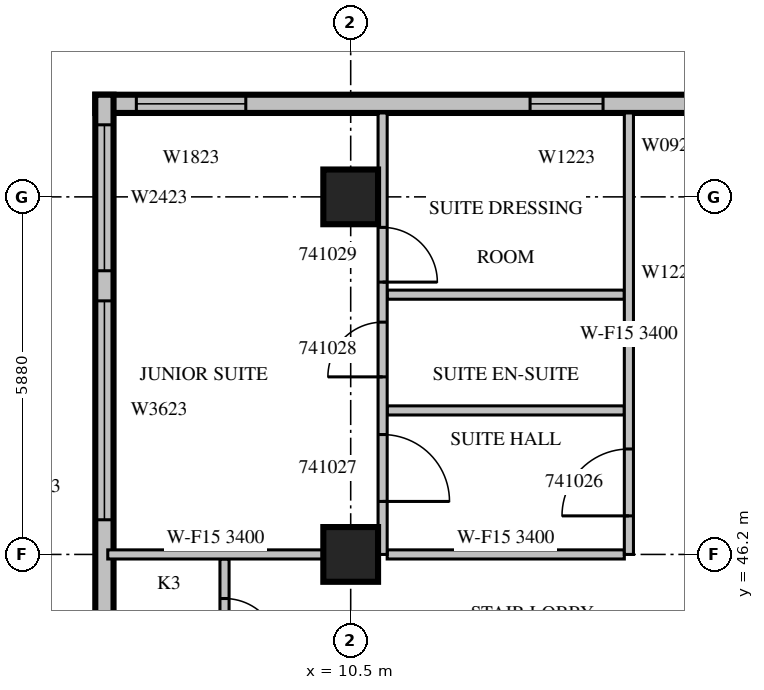
"""IFC4 building model, lengths in metres.
Left out: names, types, materials, properties, quantities, classifications, styles, units other than length and angle.
Written with IfcOpenShell. Run it as: python <this file> out.ifc"""

import sys

from ifc_helpers import new_model, si_unit, direction, frame, frame_2d, origin, origin_2d, place, context, subcontext, project, spatial, rectangle, extrude, source, transform, mapped, element, fill, save


model = new_model("IFC4")
c1 = context("Model", 3, precision=1e-05, world=origin(), true_north=direction((0.0, 1.0)))
c2 = subcontext(c1, "Body", "Model", "MODEL_VIEW")
j1 = project(units=[si_unit("LENGTHUNIT", "METRE"), si_unit("PLANEANGLEUNIT", "RADIAN")], contexts=[c1])
p1 = place(None, origin())
s1 = spatial("IfcSite", under=j1, at=p1, CompositionType="ELEMENT")
p2 = place(p1, origin())
s2 = spatial("IfcBuilding", under=s1, at=p2, CompositionType="ELEMENT")
p3 = place(p2, frame((0.0, 0.0, 189.2)))
s3 = spatial("IfcBuildingStorey", under=s2, at=p3, CompositionType="ELEMENT", Elevation=189.2)
m1 = source(origin(), c2, "Body", "SweptSolid", [
    extrude(rectangle(XDim=0.9, YDim=0.9, at=origin_2d()), origin(), (0.0, 0.0, 1.0), 3.8),
])
for number, where, z_axis, x_axis in (
    (1, (10.5, 46.2, 0.0), (0.0, 0.0, 1.0), (1.0, 0.0, 0.0)),
    (2, (10.5, 52.08, 0.0), (0.0, 0.0, 1.0), (1.0, 0.0, 0.0)),
):
    element("IfcColumn", number, at=place(p3, frame(where, z_axis=z_axis, x_axis=x_axis)), inside=s3, PredefinedType="COLUMN", context=c2, shape_type="MappedRepresentation", body=[
        mapped(m1, transform((0.0, 0.0, 0.0), scale=1.0)),
    ])
m2 = source(origin(), c2, "Body", "SweptSolid", [
    extrude(rectangle(XDim=10.5, YDim=0.3, at=frame_2d((5.25, 0.0))), origin(), (0.0, 0.0, 1.0), 3.4),
])
p4 = place(p3, frame((16.8, 53.61, 0.0), z_axis=(0.0, 0.0, 1.0), x_axis=(-1.0, 0.0, 0.0)))
e3 = element("IfcWall", 3, at=p4, inside=s3, PredefinedType="STANDARD", context=c2, shape_type="MappedRepresentation", body=[
    mapped(m2, transform((0.0, 0.0, 0.0), scale=1.0)),
])
m3 = source(origin(), c2, "Body", "SweptSolid", [
    extrude(rectangle(XDim=1.2, YDim=2.3, at=frame_2d((0.6, 1.15))), frame((0.0, 0.16, 0.0), z_axis=(0.0, -1.0, 0.0), x_axis=(1.0, 0.0, 0.0)), (0.0, 0.0, 1.0), 0.32),
])
p5 = place(p4, frame((2.15, 0.0, 0.6)))
e4 = element("IfcOpeningElement", 4, at=p5, cuts=e3, PredefinedType="OPENING", context=c2, shape_type="MappedRepresentation", body=[
    mapped(m3, transform((0.0, 0.0, 0.0), scale=1.0)),
])
m4 = source(origin(), c2, "Body", "SweptSolid", [
    extrude(rectangle(XDim=1.8, YDim=2.3, at=frame_2d((0.9, 1.15))), frame((0.0, 0.16, 0.0), z_axis=(0.0, -1.0, 0.0), x_axis=(1.0, 0.0, 0.0)), (0.0, 0.0, 1.0), 0.32),
])
p6 = place(p4, frame((8.025, 0.0, 0.6)))
e5 = element("IfcOpeningElement", 5, at=p6, cuts=e3, PredefinedType="OPENING", context=c2, shape_type="MappedRepresentation", body=[
    mapped(m4, transform((0.0, 0.0, 0.0), scale=1.0)),
])
m5 = source(origin(), c2, "Body", "SweptSolid", [
    extrude(rectangle(XDim=9.91, YDim=0.3, at=frame_2d((4.955, 0.0))), origin(), (0.0, 0.0, 1.0), 3.4),
])
p7 = place(p3, frame((6.45, 53.76, 0.0), z_axis=(0.0, 0.0, 1.0), x_axis=(0.0, -1.0, 0.0)))
e6 = element("IfcWall", 6, at=p7, inside=s3, PredefinedType="STANDARD", context=c2, shape_type="MappedRepresentation", body=[
    mapped(m5, transform((0.0, 0.0, 0.0), scale=1.0)),
])
m6 = source(origin(), c2, "Body", "SweptSolid", [
    extrude(rectangle(XDim=3.6, YDim=2.3, at=frame_2d((1.8, 1.15))), frame((0.0, 0.16, 0.0), z_axis=(0.0, -1.0, 0.0), x_axis=(1.0, 0.0, 0.0)), (0.0, 0.0, 1.0), 0.32),
])
p8 = place(p7, frame((3.39, 0.0, 0.6)))
e7 = element("IfcOpeningElement", 7, at=p8, cuts=e6, PredefinedType="OPENING", context=c2, shape_type="MappedRepresentation", body=[
    mapped(m6, transform((0.0, 0.0, 0.0), scale=1.0)),
])
m7 = source(origin(), c2, "Body", "SweptSolid", [
    extrude(rectangle(XDim=2.4, YDim=2.3, at=frame_2d((1.2, 1.15))), frame((0.0, 0.16, 0.0), z_axis=(0.0, -1.0, 0.0), x_axis=(1.0, 0.0, 0.0)), (0.0, 0.0, 1.0), 0.32),
])
p9 = place(p7, frame((0.495, 0.0, 0.6)))
e8 = element("IfcOpeningElement", 8, at=p9, cuts=e6, PredefinedType="OPENING", context=c2, shape_type="MappedRepresentation", body=[
    mapped(m7, transform((0.0, 0.0, 0.0), scale=1.0)),
])
m8 = source(origin(), c2, "Body", "SweptSolid", [
    extrude(rectangle(XDim=2.2, YDim=0.15, at=frame_2d((1.1, 0.0))), origin(), (0.0, 0.0, 1.0), 3.4),
])
p10 = place(p3, frame((8.425, 43.925, 0.0), z_axis=(0.0, 0.0, 1.0), x_axis=(0.0, 1.0, 0.0)))
e9 = element("IfcWall", 9, at=p10, inside=s3, PredefinedType="PARTITIONING", context=c2, shape_type="MappedRepresentation", body=[
    mapped(m8, transform((0.0, 0.0, 0.0), scale=1.0)),
])
m9 = source(origin(), c2, "Body", "SweptSolid", [
    extrude(rectangle(XDim=0.9, YDim=2.1, at=frame_2d((0.45, 1.05))), frame((0.0, 0.085, 0.0), z_axis=(0.0, -1.0, 0.0), x_axis=(1.0, 0.0, 0.0)), (0.0, 0.0, 1.0), 0.17),
])
p11 = place(p10, frame((0.65, 0.0, 0.0)))
e10 = element("IfcOpeningElement", 10, at=p11, cuts=e9, PredefinedType="OPENING", context=c2, shape_type="MappedRepresentation", body=[
    mapped(m9, transform((0.0, 0.0, 0.0), scale=1.0)),
])
m10 = source(origin(), c2, "Body", "SweptSolid", [
    extrude(rectangle(XDim=3.9, YDim=0.15, at=frame_2d((1.95, 0.0))), origin(), (0.0, 0.0, 1.0), 3.4),
])
for number, where, z_axis, x_axis in (
    (11, (15.0, 48.568, 0.0), (0.0, 0.0, 1.0), (-1.0, 0.0, 0.0)),
    (12, (15.0, 50.472, 0.0), (0.0, 0.0, 1.0), (-1.0, 0.0, 0.0)),
):
    element("IfcWall", number, at=place(p3, frame(where, z_axis=z_axis, x_axis=x_axis)), inside=s3, PredefinedType="PARTITIONING", context=c2, shape_type="MappedRepresentation", body=[
        mapped(m10, transform((0.0, 0.0, 0.0), scale=1.0)),
    ])
m11 = source(origin(), c2, "Body", "SweptSolid", [
    extrude(rectangle(XDim=3.546, YDim=0.15, at=frame_2d((1.773, 0.0))), origin(), (0.0, 0.0, 1.0), 3.4),
])
p12 = place(p3, frame((10.051, 46.2, 0.0), z_axis=(0.0, 0.0, 1.0), x_axis=(-1.0, 0.0, 0.0)))
e13 = element("IfcWall", 13, at=p12, inside=s3, PredefinedType="PARTITIONING", context=c2, shape_type="MappedRepresentation", body=[
    mapped(m11, transform((0.0, 0.0, 0.0), scale=1.0)),
])
p13 = place(p3, frame((15.0, 46.2, 0.0), z_axis=(0.0, 0.0, 1.0), x_axis=(-1.0, 0.0, 0.0)))
e14 = element("IfcWall", 14, at=p13, inside=s3, PredefinedType="PARTITIONING", context=c2, shape_type="MappedRepresentation", body=[
    mapped(m10, transform((0.0, 0.0, 0.0), scale=1.0)),
])
m12 = source(origin(), c2, "Body", "SweptSolid", [
    extrude(rectangle(XDim=7.26, YDim=0.15, at=frame_2d((3.63, 0.0))), origin(), (0.0, 0.0, 1.0), 3.4),
])
p14 = place(p3, frame((11.025, 46.2, 0.0), z_axis=(0.0, 0.0, 1.0), x_axis=(0.0, 1.0, 0.0)))
e15 = element("IfcWall", 15, at=p14, inside=s3, PredefinedType="PARTITIONING", context=c2, shape_type="MappedRepresentation", body=[
    mapped(m12, transform((0.0, 0.0, 0.0), scale=1.0)),
])
m13 = source(origin(), c2, "Body", "SweptSolid", [
    extrude(rectangle(XDim=1.1, YDim=2.1, at=frame_2d((0.55, 1.05))), frame((0.0, 0.085, 0.0), z_axis=(0.0, -1.0, 0.0), x_axis=(1.0, 0.0, 0.0)), (0.0, 0.0, 1.0), 0.17),
])
p15 = place(p14, frame((0.872, 0.0, 0.0)))
e16 = element("IfcOpeningElement", 16, at=p15, cuts=e15, PredefinedType="OPENING", context=c2, shape_type="MappedRepresentation", body=[
    mapped(m13, transform((0.0, 0.0, 0.0), scale=1.0)),
])
p16 = place(p14, frame((2.92, 0.0, 0.0)))
e17 = element("IfcOpeningElement", 17, at=p16, cuts=e15, PredefinedType="OPENING", context=c2, shape_type="MappedRepresentation", body=[
    mapped(m9, transform((0.0, 0.0, 0.0), scale=1.0)),
])
p17 = place(p14, frame((4.478, 0.0, 0.0)))
e18 = element("IfcOpeningElement", 18, at=p17, cuts=e15, PredefinedType="OPENING", context=c2, shape_type="MappedRepresentation", body=[
    mapped(m9, transform((0.0, 0.0, 0.0), scale=1.0)),
])
p18 = place(p3, frame((15.075, 46.2, 0.0), z_axis=(0.0, 0.0, 1.0), x_axis=(0.0, 1.0, 0.0)))
e19 = element("IfcWall", 19, at=p18, inside=s3, PredefinedType="PARTITIONING", context=c2, shape_type="MappedRepresentation", body=[
    mapped(m12, transform((0.0, 0.0, 0.0), scale=1.0)),
])
p19 = place(p18, frame((0.634, 0.0, 0.0)))
e20 = element("IfcOpeningElement", 20, at=p19, cuts=e19, PredefinedType="OPENING", context=c2, shape_type="MappedRepresentation", body=[
    mapped(m13, transform((0.0, 0.0, 0.0), scale=1.0)),
])
m14 = source(origin(), c2, "Body", "SweptSolid", [
    extrude(rectangle(XDim=1.2, YDim=2.3, at=frame_2d((0.6, 1.15))), frame((0.0, 0.03, 0.0), z_axis=(0.0, -1.0, 0.0), x_axis=(1.0, 0.0, 0.0)), (0.0, 0.0, 1.0), 0.06),
])
p20 = place(p5, origin())
e21 = element("IfcWindow", 21, at=p20, inside=s3, PartitioningType="SINGLE_PANEL", PredefinedType="WINDOW", context=c2, shape_type="MappedRepresentation", body=[
    mapped(m14, transform((0.0, 0.0, 0.0), scale=1.0)),
])
fill(e4, e21)
m15 = source(origin(), c2, "Body", "SweptSolid", [
    extrude(rectangle(XDim=1.8, YDim=2.3, at=frame_2d((0.9, 1.15))), frame((0.0, 0.03, 0.0), z_axis=(0.0, -1.0, 0.0), x_axis=(1.0, 0.0, 0.0)), (0.0, 0.0, 1.0), 0.06),
])
p21 = place(p6, origin())
e22 = element("IfcWindow", 22, at=p21, inside=s3, PartitioningType="SINGLE_PANEL", PredefinedType="WINDOW", context=c2, shape_type="MappedRepresentation", body=[
    mapped(m15, transform((0.0, 0.0, 0.0), scale=1.0)),
])
fill(e5, e22)
m16 = source(origin(), c2, "Body", "SweptSolid", [
    extrude(rectangle(XDim=3.6, YDim=2.3, at=frame_2d((1.8, 1.15))), frame((0.0, 0.03, 0.0), z_axis=(0.0, -1.0, 0.0), x_axis=(1.0, 0.0, 0.0)), (0.0, 0.0, 1.0), 0.06),
])
p22 = place(p8, origin())
e23 = element("IfcWindow", 23, at=p22, inside=s3, PartitioningType="SINGLE_PANEL", PredefinedType="WINDOW", context=c2, shape_type="MappedRepresentation", body=[
    mapped(m16, transform((0.0, 0.0, 0.0), scale=1.0)),
])
fill(e7, e23)
m17 = source(origin(), c2, "Body", "SweptSolid", [
    extrude(rectangle(XDim=2.4, YDim=2.3, at=frame_2d((1.2, 1.15))), frame((0.0, 0.03, 0.0), z_axis=(0.0, -1.0, 0.0), x_axis=(1.0, 0.0, 0.0)), (0.0, 0.0, 1.0), 0.06),
])
p23 = place(p9, origin())
e24 = element("IfcWindow", 24, at=p23, inside=s3, PartitioningType="SINGLE_PANEL", PredefinedType="WINDOW", context=c2, shape_type="MappedRepresentation", body=[
    mapped(m17, transform((0.0, 0.0, 0.0), scale=1.0)),
])
fill(e8, e24)
m18 = source(origin(), c2, "Body", "SweptSolid", [
    extrude(rectangle(XDim=0.9, YDim=2.1, at=frame_2d((0.45, 1.05))), frame((0.0, 0.025, 0.0), z_axis=(0.0, -1.0, 0.0), x_axis=(1.0, 0.0, 0.0)), (0.0, 0.0, 1.0), 0.05),
])
p24 = place(p11, origin())
e25 = element("IfcDoor", 25, at=p24, inside=s3, OperationType="SINGLE_SWING_RIGHT", PredefinedType="DOOR", context=c2, shape_type="MappedRepresentation", body=[
    mapped(m18, transform((0.0, 0.0, 0.0), scale=1.0)),
])
fill(e10, e25)
m19 = source(origin(), c2, "Body", "SweptSolid", [
    extrude(rectangle(XDim=1.1, YDim=2.1, at=frame_2d((0.55, 1.05))), frame((0.0, 0.025, 0.0), z_axis=(0.0, -1.0, 0.0), x_axis=(1.0, 0.0, 0.0)), (0.0, 0.0, 1.0), 0.05),
])
p25 = place(p19, origin())
e26 = element("IfcDoor", 26, at=p25, inside=s3, OperationType="SINGLE_SWING_LEFT", PredefinedType="DOOR", context=c2, shape_type="MappedRepresentation", body=[
    mapped(m19, transform((0.0, 0.0, 0.0), scale=1.0)),
])
fill(e20, e26)
p26 = place(p15, origin())
e27 = element("IfcDoor", 27, at=p26, inside=s3, OperationType="SINGLE_SWING_RIGHT", PredefinedType="DOOR", context=c2, shape_type="MappedRepresentation", body=[
    mapped(m19, transform((0.0, 0.0, 0.0), scale=1.0)),
])
fill(e16, e27)
p27 = place(p16, origin())
e28 = element("IfcDoor", 28, at=p27, inside=s3, OperationType="SINGLE_SWING_LEFT", PredefinedType="DOOR", context=c2, shape_type="MappedRepresentation", body=[
    mapped(m18, transform((0.0, 0.0, 0.0), scale=1.0)),
])
fill(e17, e28)
p28 = place(p17, origin())
e29 = element("IfcDoor", 29, at=p28, inside=s3, OperationType="SINGLE_SWING_RIGHT", PredefinedType="DOOR", context=c2, shape_type="MappedRepresentation", body=[
    mapped(m18, transform((0.0, 0.0, 0.0), scale=1.0)),
])
fill(e18, e29)
save(model, sys.argv[1])
